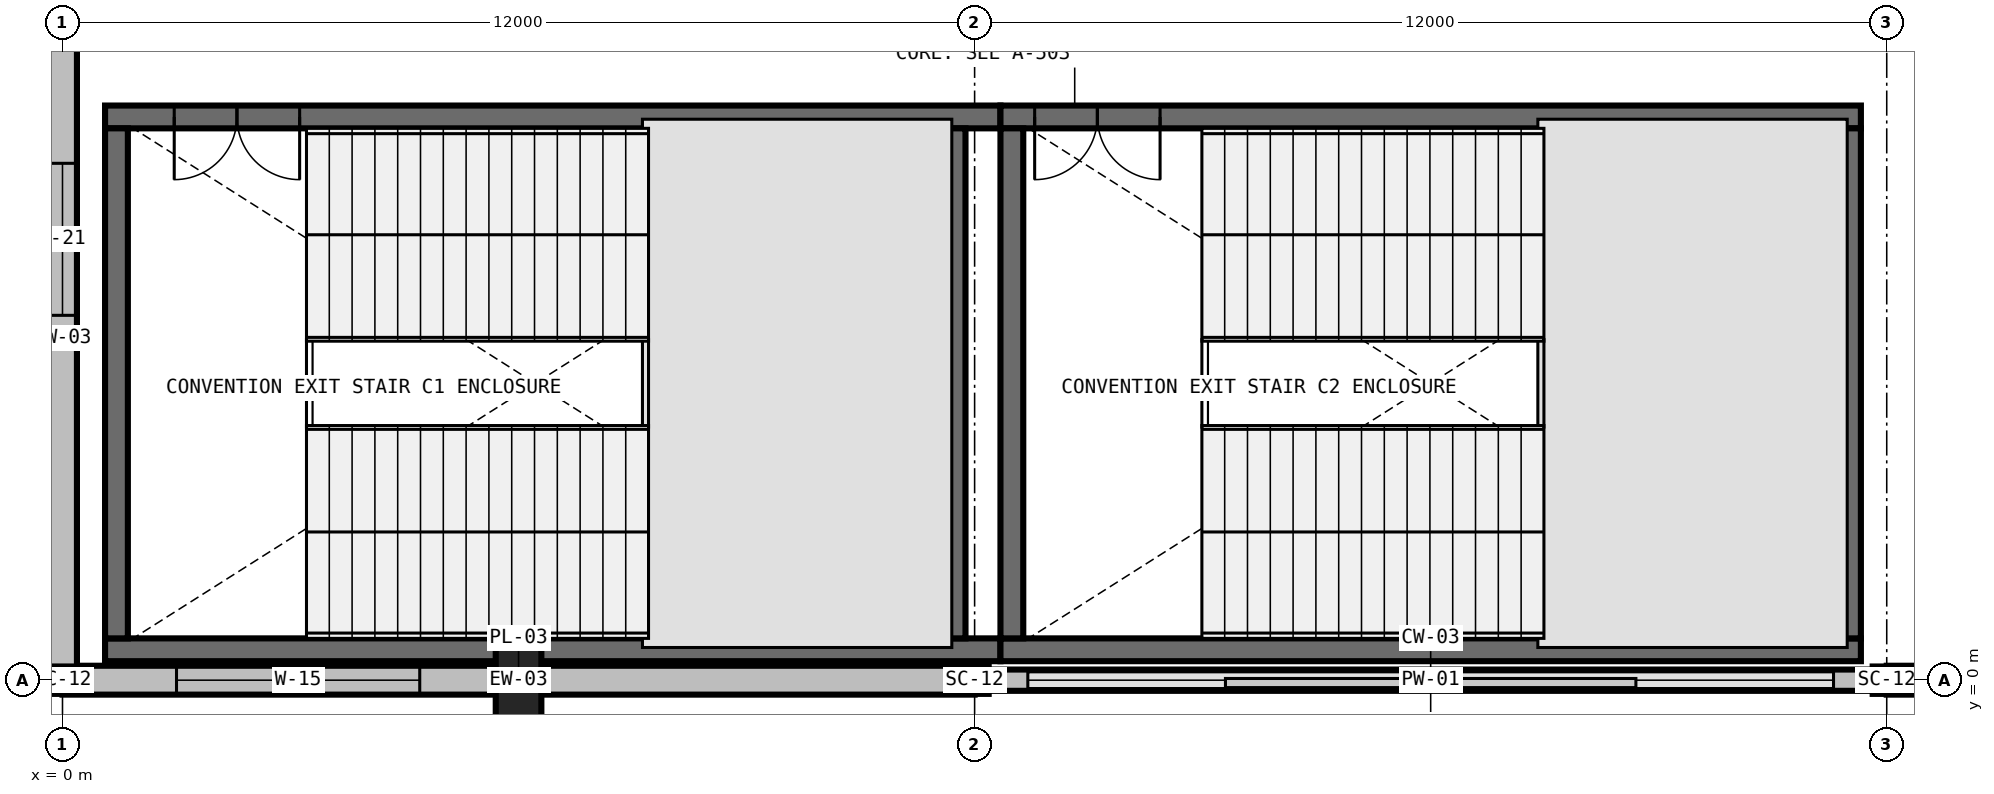
"""IFC4 building model, lengths in metres.
Left out: names, types, materials, properties, quantities, classifications, styles, units other than length and angle.
Written with IfcOpenShell. Run it as: python <this file> out.ifc"""

import sys

from ifc_helpers import new_model, si_unit, direction, frame, frame_2d, origin, origin_with_axes, origin_2d, place, context, subcontext, project, spatial, rectangle, i_section, extrude, element, fill, save


model = new_model("IFC4")
c1 = context("Model", 3, precision=1e-05, world=origin(), true_north=direction((0.0, 1.0)))
c2 = subcontext(c1, "Body", "Model", "MODEL_VIEW")
j1 = project(units=[si_unit("LENGTHUNIT", "METRE"), si_unit("PLANEANGLEUNIT", "RADIAN")], contexts=[c1])
p1 = place(None, origin())
s1 = spatial("IfcSite", under=j1, at=p1, CompositionType="ELEMENT")
p2 = place(p1, origin())
s2 = spatial("IfcBuilding", under=s1, at=p2, CompositionType="ELEMENT")
p3 = place(p2, frame((0.0, 0.0, 18.0)))
s3 = spatial("IfcBuildingStorey", under=s2, at=p3, CompositionType="ELEMENT", Elevation=18.0)
for number, where, z_axis, x_axis in (
    (1, (0.0, 0.0, 0.0), (0.0, 0.0, 1.0), (1.0, 0.0, 0.0)),
    (2, (12.0, 0.0, 0.0), (0.0, 0.0, 1.0), (1.0, 0.0, 0.0)),
    (3, (24.0, 0.0, 0.0), (0.0, 0.0, 1.0), (1.0, 0.0, 0.0)),
):
    element("IfcColumn", number, at=place(p3, frame(where, z_axis=z_axis, x_axis=x_axis)), inside=s3, PredefinedType="COLUMN", context=c2, shape_type="SweptSolid", body=[
        extrude(i_section(OverallWidth=0.37, OverallDepth=0.36, WebThickness=0.012, FlangeThickness=0.02, FilletRadius=0.031, at=origin_2d()), origin(), (0.0, 0.0, 1.0), 5.4),
    ])
p4 = place(p3, frame((6.0, 0.0, 0.0), z_axis=(0.0, 0.0, 1.0), x_axis=(1.0, 0.0, 0.0)))
e4 = element("IfcColumn", 4, at=p4, inside=s3, PredefinedType="PILASTER", context=c2, shape_type="SweptSolid", body=[
    extrude(rectangle(XDim=0.6, YDim=1.0, at=origin_2d()), origin(), (0.0, 0.0, 1.0), 5.4),
])
p5 = place(p3, frame((12.34, 0.4, 0.0), z_axis=(0.0, 0.0, 1.0), x_axis=(-1.0, 0.0, 0.0)))
e5 = element("IfcWall", 5, at=p5, inside=s3, PredefinedType="SHEAR", context=c2, shape_type="SweptSolid", body=[
    extrude(rectangle(XDim=11.78, YDim=0.3, at=frame_2d((5.89, 0.0))), origin(), (0.0, 0.0, 1.0), 5.4),
])
p6 = place(p3, frame((12.34, 7.41, 0.0), z_axis=(0.0, 0.0, 1.0), x_axis=(-1.0, 0.0, 0.0)))
e6 = element("IfcWall", 6, at=p6, inside=s3, PredefinedType="SHEAR", context=c2, shape_type="SweptSolid", body=[
    extrude(rectangle(XDim=11.78, YDim=0.3, at=frame_2d((5.89, 0.0))), origin(), (0.0, 0.0, 1.0), 5.4),
])
p7 = place(p6, frame((9.22, 0.0, 0.0)))
e7 = element("IfcOpeningElement", 7, at=p7, cuts=e6, PredefinedType="OPENING", context=c2, shape_type="SweptSolid", body=[
    extrude(rectangle(XDim=1.65, YDim=2.25, at=frame_2d((0.825, 1.125))), frame((0.0, 0.165, 0.0), z_axis=(0.0, -1.0, 0.0), x_axis=(1.0, 0.0, 0.0)), (0.0, 0.0, 1.0), 0.33),
])
for number, where, z_axis, x_axis in (
    (8, (0.71, 7.26, 0.0), (0.0, 0.0, 1.0), (0.0, -1.0, 0.0)),
    (9, (11.73, 0.55, 0.0), (0.0, 0.0, 1.0), (0.0, 1.0, 0.0)),
):
    element("IfcWall", number, at=place(p3, frame(where, z_axis=z_axis, x_axis=x_axis)), inside=s3, PredefinedType="SHEAR", context=c2, shape_type="SweptSolid", body=[
        extrude(rectangle(XDim=6.71, YDim=0.3, at=frame_2d((3.355, 0.0))), origin(), (0.0, 0.0, 1.0), 5.4),
    ])
p8 = place(p3, frame((23.66, 0.4, 0.0), z_axis=(0.0, 0.0, 1.0), x_axis=(-1.0, 0.0, 0.0)))
e10 = element("IfcWall", 10, at=p8, inside=s3, PredefinedType="SHEAR", context=c2, shape_type="SweptSolid", body=[
    extrude(rectangle(XDim=11.32, YDim=0.3, at=frame_2d((5.66, 0.0))), origin(), (0.0, 0.0, 1.0), 5.4),
])
p9 = place(p3, frame((23.66, 7.41, 0.0), z_axis=(0.0, 0.0, 1.0), x_axis=(-1.0, 0.0, 0.0)))
e11 = element("IfcWall", 11, at=p9, inside=s3, PredefinedType="SHEAR", context=c2, shape_type="SweptSolid", body=[
    extrude(rectangle(XDim=11.32, YDim=0.3, at=frame_2d((5.66, 0.0))), origin(), (0.0, 0.0, 1.0), 5.4),
])
p10 = place(p9, frame((9.22, 0.0, 0.0)))
e12 = element("IfcOpeningElement", 12, at=p10, cuts=e11, PredefinedType="OPENING", context=c2, shape_type="SweptSolid", body=[
    extrude(rectangle(XDim=1.65, YDim=2.25, at=frame_2d((0.825, 1.125))), frame((0.0, 0.165, 0.0), z_axis=(0.0, -1.0, 0.0), x_axis=(1.0, 0.0, 0.0)), (0.0, 0.0, 1.0), 0.33),
])
for number, where, z_axis, x_axis in (
    (13, (12.49, 7.26, 0.0), (0.0, 0.0, 1.0), (0.0, -1.0, 0.0)),
    (14, (23.51, 0.55, 0.0), (0.0, 0.0, 1.0), (0.0, 1.0, 0.0)),
):
    element("IfcWall", number, at=place(p3, frame(where, z_axis=z_axis, x_axis=x_axis)), inside=s3, PredefinedType="SHEAR", context=c2, shape_type="SweptSolid", body=[
        extrude(rectangle(XDim=6.71, YDim=0.3, at=frame_2d((3.355, 0.0))), origin(), (0.0, 0.0, 1.0), 5.4),
    ])
p11 = place(p3, origin_with_axes())
e15 = element("IfcWall", 15, at=p11, inside=s3, PredefinedType="STANDARD", context=c2, shape_type="SweptSolid", body=[
    extrude(rectangle(XDim=12.0, YDim=0.38, at=frame_2d((6.0, 0.0))), origin(), (0.0, 0.0, 1.0), 4.176),
])
p12 = place(p11, frame((1.5, 0.0, 0.85)))
e16 = element("IfcOpeningElement", 16, at=p12, cuts=e15, PredefinedType="OPENING", context=c2, shape_type="SweptSolid", body=[
    extrude(rectangle(XDim=3.2, YDim=2.4, at=frame_2d((1.6, 1.2))), frame((0.0, 0.205, 0.0), z_axis=(0.0, -1.0, 0.0), x_axis=(1.0, 0.0, 0.0)), (0.0, 0.0, 1.0), 0.41),
])
p13 = place(p3, frame((12.0, 0.0, 0.0), z_axis=(0.0, 0.0, 1.0), x_axis=(1.0, 0.0, 0.0)))
e17 = element("IfcWall", 17, at=p13, inside=s3, PredefinedType="PARAPET", context=c2, shape_type="SweptSolid", body=[
    extrude(rectangle(XDim=12.0, YDim=0.28, at=frame_2d((6.0, 0.0))), origin(), (0.0, 0.0, 1.0), 0.2),
])
p14 = place(p3, frame((24.0, 0.0, 0.0), z_axis=(0.0, 0.0, 1.0), x_axis=(1.0, 0.0, 0.0)))
e18 = element("IfcWall", 18, at=p14, inside=s3, PredefinedType="STANDARD", context=c2, shape_type="SweptSolid", body=[
    extrude(rectangle(XDim=6.0, YDim=0.38, at=frame_2d((3.0, 0.0))), origin(), (0.0, 0.0, 1.0), 4.176),
])
p15 = place(p3, frame((0.0, 9.0, 0.0), z_axis=(0.0, 0.0, 1.0), x_axis=(0.0, -1.0, 0.0)))
e19 = element("IfcWall", 19, at=p15, inside=s3, PredefinedType="STANDARD", context=c2, shape_type="SweptSolid", body=[
    extrude(rectangle(XDim=9.0, YDim=0.38, at=frame_2d((4.5, 0.0))), origin(), (0.0, 0.0, 1.0), 4.669),
])
p16 = place(p15, frame((2.2, 0.0, 1.0)))
e20 = element("IfcOpeningElement", 20, at=p16, cuts=e19, PredefinedType="OPENING", context=c2, shape_type="SweptSolid", body=[
    extrude(rectangle(XDim=2.0, YDim=1.85, at=frame_2d((1.0, 0.925))), frame((0.0, 0.205, 0.0), z_axis=(0.0, -1.0, 0.0), x_axis=(1.0, 0.0, 0.0)), (0.0, 0.0, 1.0), 0.41),
])
p17 = place(p7, origin())
e21 = element("IfcDoor", 21, at=p17, inside=s3, OperationType="DOUBLE_DOOR_SINGLE_SWING", PredefinedType="DOOR", context=c2, shape_type="SweptSolid", body=[
    extrude(rectangle(XDim=1.65, YDim=2.25, at=frame_2d((0.825, 1.125))), frame((0.0, 0.025, 0.0), z_axis=(0.0, -1.0, 0.0), x_axis=(1.0, 0.0, 0.0)), (0.0, 0.0, 1.0), 0.05),
])
fill(e7, e21)
p18 = place(p10, origin())
e22 = element("IfcDoor", 22, at=p18, inside=s3, OperationType="DOUBLE_DOOR_SINGLE_SWING", PredefinedType="DOOR", context=c2, shape_type="SweptSolid", body=[
    extrude(rectangle(XDim=1.65, YDim=2.25, at=frame_2d((0.825, 1.125))), frame((0.0, 0.025, 0.0), z_axis=(0.0, -1.0, 0.0), x_axis=(1.0, 0.0, 0.0)), (0.0, 0.0, 1.0), 0.05),
])
fill(e12, e22)
p19 = place(p12, origin())
e23 = element("IfcWindow", 23, at=p19, inside=s3, PartitioningType="TRIPLE_PANEL_VERTICAL", PredefinedType="WINDOW", context=c2, shape_type="SweptSolid", body=[
    extrude(rectangle(XDim=3.2, YDim=2.4, at=frame_2d((1.6, 1.2))), frame((0.0, 0.03, 0.0), z_axis=(0.0, -1.0, 0.0), x_axis=(1.0, 0.0, 0.0)), (0.0, 0.0, 1.0), 0.06),
])
fill(e16, e23)
p20 = place(p16, origin())
e24 = element("IfcWindow", 24, at=p20, inside=s3, PartitioningType="DOUBLE_PANEL_VERTICAL", PredefinedType="WINDOW", context=c2, shape_type="SweptSolid", body=[
    extrude(rectangle(XDim=2.0, YDim=1.85, at=frame_2d((1.0, 0.925))), frame((0.0, 0.03, 0.0), z_axis=(0.0, -1.0, 0.0), x_axis=(1.0, 0.0, 0.0)), (0.0, 0.0, 1.0), 0.06),
])
fill(e20, e24)
save(model, sys.argv[1])
